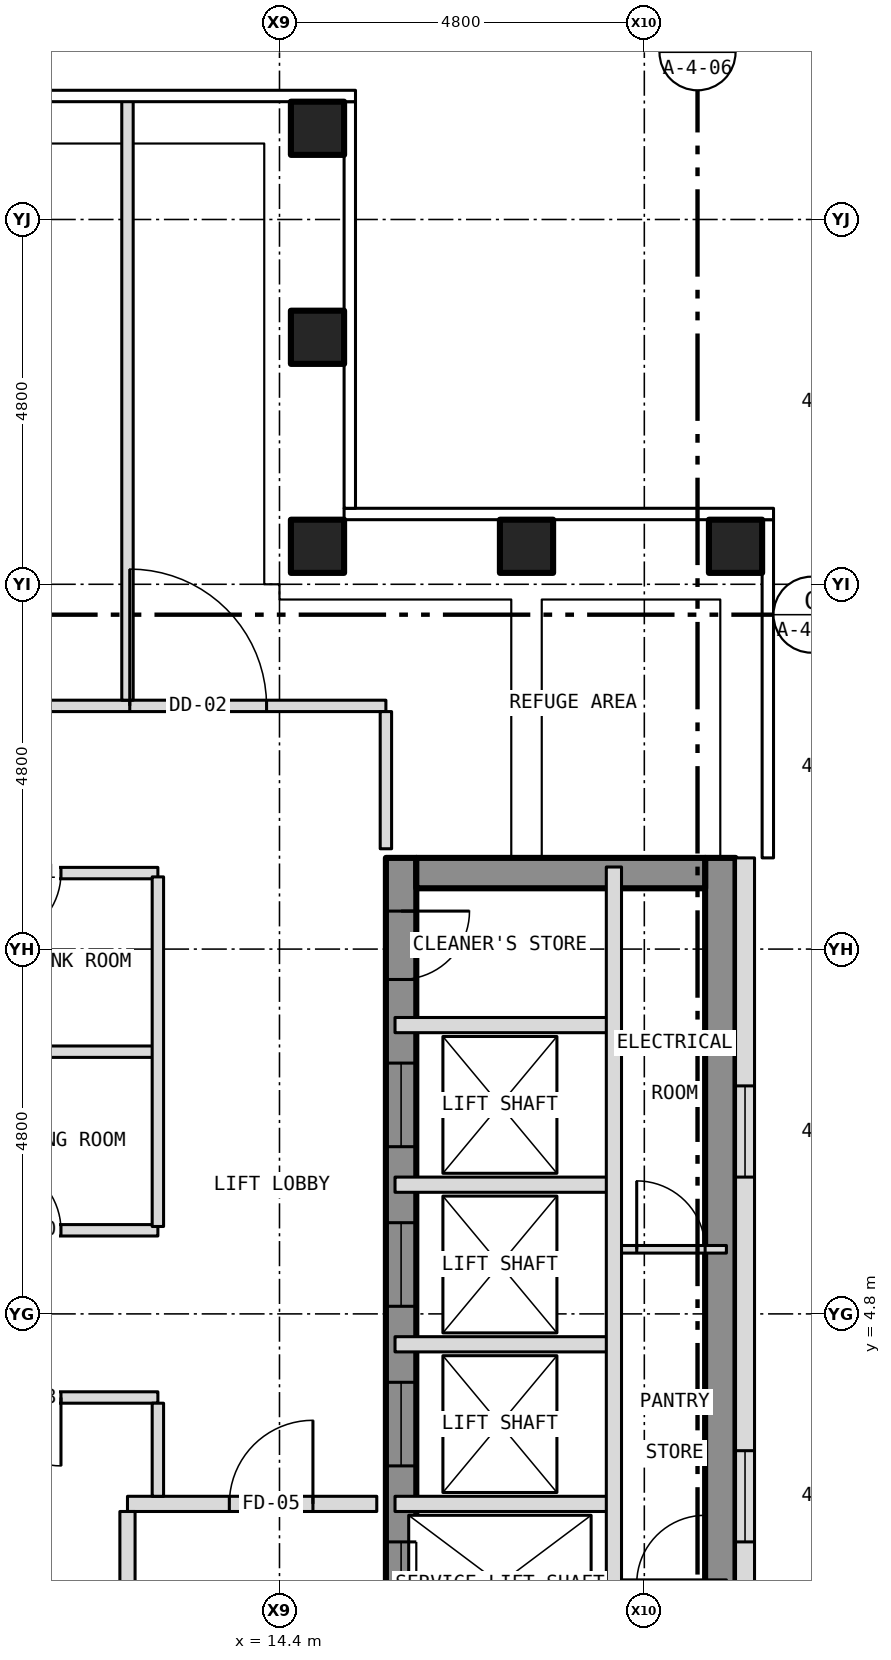
"""IFC4 building model, lengths in metres.
Left out: names, types, materials, properties, quantities, classifications, styles, units other than length and angle.
Written with IfcOpenShell. Run it as: python <this file> out.ifc"""

import sys

from ifc_helpers import new_model, si_unit, direction, frame, frame_2d, origin, origin_2d, place, context, subcontext, project, spatial, rectangle, hollow_rectangle, extrude, element, fill, save


model = new_model("IFC4")
c1 = context("Model", 3, precision=1e-05, world=origin(), true_north=direction((0.0, 1.0)))
c2 = subcontext(c1, "Body", "Model", "MODEL_VIEW")
j1 = project(units=[si_unit("LENGTHUNIT", "METRE"), si_unit("PLANEANGLEUNIT", "RADIAN")], contexts=[c1])
p1 = place(None, origin())
s1 = spatial("IfcSite", under=j1, at=p1, CompositionType="ELEMENT")
p2 = place(p1, origin())
s2 = spatial("IfcBuilding", under=s1, at=p2, CompositionType="ELEMENT")
p3 = place(p2, frame((0.0, 0.0, 236.5)))
s3 = spatial("IfcBuildingStorey", under=s2, at=p3, CompositionType="ELEMENT", Elevation=236.5)
for number, where, z_axis, x_axis in (
    (1, (14.9, 20.4, -0.3), (0.0, 0.0, 1.0), (1.0, 0.0, 0.0)),
    (2, (20.4, 14.9, -0.3), (0.0, 0.0, 1.0), (1.0, 0.0, 0.0)),
    (3, (14.9, 14.9, -0.3), (0.0, 0.0, 1.0), (1.0, 0.0, 0.0)),
    (4, (14.9, 17.65, -0.3), (0.0, 0.0, 1.0), (1.0, 0.0, 0.0)),
    (5, (17.65, 14.9, -0.3), (0.0, 0.0, 1.0), (1.0, 0.0, 0.0)),
):
    element("IfcColumn", number, at=place(p3, frame(where, z_axis=z_axis, x_axis=x_axis)), inside=s3, PredefinedType="COLUMN", context=c2, shape_type="SweptSolid", body=[
        extrude(hollow_rectangle(XDim=0.7, YDim=0.7, WallThickness=0.04, at=origin_2d()), origin(), (0.0, 0.0, 1.0), 4.65),
    ])
p4 = place(p3, frame((16.0, -10.8, 0.0), z_axis=(0.0, 0.0, 1.0), x_axis=(0.0, 1.0, 0.0)))
e6 = element("IfcWall", 6, at=p4, inside=s3, PredefinedType="SHEAR", context=c2, shape_type="SweptSolid", body=[
    extrude(rectangle(XDim=21.6, YDim=0.4, at=frame_2d((10.8, 0.0))), origin(), (0.0, 0.0, 1.0), 3.9),
])
p5 = place(p4, frame((9.4, 0.0, 0.0)))
e7 = element("IfcOpeningElement", 7, at=p5, cuts=e6, PredefinedType="OPENING", context=c2, shape_type="SweptSolid", body=[
    extrude(rectangle(XDim=1.1, YDim=2.1, at=frame_2d((0.55, 1.05))), frame((0.0, 0.212, 0.0), z_axis=(0.0, -1.0, 0.0), x_axis=(1.0, 0.0, 0.0)), (0.0, 0.0, 1.0), 0.424),
])
p6 = place(p4, frame((11.5, 0.0, 0.0)))
e8 = element("IfcOpeningElement", 8, at=p6, cuts=e6, PredefinedType="OPENING", context=c2, shape_type="SweptSolid", body=[
    extrude(rectangle(XDim=1.1, YDim=2.1, at=frame_2d((0.55, 1.05))), frame((0.0, 0.212, 0.0), z_axis=(0.0, -1.0, 0.0), x_axis=(1.0, 0.0, 0.0)), (0.0, 0.0, 1.0), 0.424),
])
p7 = place(p4, frame((13.6, 0.0, 0.0)))
e9 = element("IfcOpeningElement", 9, at=p7, cuts=e6, PredefinedType="OPENING", context=c2, shape_type="SweptSolid", body=[
    extrude(rectangle(XDim=1.1, YDim=2.1, at=frame_2d((0.55, 1.05))), frame((0.0, 0.212, 0.0), z_axis=(0.0, -1.0, 0.0), x_axis=(1.0, 0.0, 0.0)), (0.0, 0.0, 1.0), 0.424),
])
p8 = place(p4, frame((15.7, 0.0, 0.0)))
e10 = element("IfcOpeningElement", 10, at=p8, cuts=e6, PredefinedType="OPENING", context=c2, shape_type="SweptSolid", body=[
    extrude(rectangle(XDim=1.1, YDim=2.1, at=frame_2d((0.55, 1.05))), frame((0.0, 0.212, 0.0), z_axis=(0.0, -1.0, 0.0), x_axis=(1.0, 0.0, 0.0)), (0.0, 0.0, 1.0), 0.424),
])
p9 = place(p4, frame((17.8, 0.0, 0.0)))
e11 = element("IfcOpeningElement", 11, at=p9, cuts=e6, PredefinedType="OPENING", context=c2, shape_type="SweptSolid", body=[
    extrude(rectangle(XDim=1.1, YDim=2.1, at=frame_2d((0.55, 1.05))), frame((0.0, 0.212, 0.0), z_axis=(0.0, -1.0, 0.0), x_axis=(1.0, 0.0, 0.0)), (0.0, 0.0, 1.0), 0.424),
])
p10 = place(p4, frame((5.642, 0.0, 0.0)))
e12 = element("IfcOpeningElement", 12, at=p10, cuts=e6, PredefinedType="OPENING", context=c2, shape_type="SweptSolid", body=[
    extrude(rectangle(XDim=1.1, YDim=2.1, at=frame_2d((0.55, 1.05))), frame((0.0, 0.212, 0.0), z_axis=(0.0, -1.0, 0.0), x_axis=(1.0, 0.0, 0.0)), (0.0, 0.0, 1.0), 0.424),
])
p11 = place(p4, frame((7.5, 0.0, 0.0)))
e13 = element("IfcOpeningElement", 13, at=p11, cuts=e6, PredefinedType="OPENING", context=c2, shape_type="SweptSolid", body=[
    extrude(rectangle(XDim=1.1, YDim=2.1, at=frame_2d((0.55, 1.05))), frame((0.0, 0.212, 0.0), z_axis=(0.0, -1.0, 0.0), x_axis=(1.0, 0.0, 0.0)), (0.0, 0.0, 1.0), 0.424),
])
p12 = place(p4, frame((20.0, 0.0, 0.0)))
e14 = element("IfcOpeningElement", 14, at=p12, cuts=e6, PredefinedType="OPENING", context=c2, shape_type="SweptSolid", body=[
    extrude(rectangle(XDim=0.9, YDim=2.1, at=frame_2d((0.45, 1.05))), frame((0.0, 0.212, 0.0), z_axis=(0.0, -1.0, 0.0), x_axis=(1.0, 0.0, 0.0)), (0.0, 0.0, 1.0), 0.424),
])
p13 = place(p3, frame((20.2, -10.8, 0.0), z_axis=(0.0, 0.0, 1.0), x_axis=(0.0, 1.0, 0.0)))
e15 = element("IfcWall", 15, at=p13, inside=s3, PredefinedType="SHEAR", context=c2, shape_type="SweptSolid", body=[
    extrude(rectangle(XDim=21.6, YDim=0.4, at=frame_2d((10.8, 0.0))), origin(), (0.0, 0.0, 1.0), 3.9),
])
p14 = place(p3, frame((16.2, 10.6, 0.0), z_axis=(0.0, 0.0, 1.0), x_axis=(1.0, 0.0, 0.0)))
e16 = element("IfcWall", 16, at=p14, inside=s3, PredefinedType="SHEAR", context=c2, shape_type="SweptSolid", body=[
    extrude(rectangle(XDim=3.8, YDim=0.4, at=frame_2d((1.9, 0.0))), origin(), (0.0, 0.0, 1.0), 3.9),
])
p15 = place(p3, frame((20.525, -10.8, 0.0), z_axis=(0.0, 0.0, 1.0), x_axis=(0.0, 1.0, 0.0)))
e17 = element("IfcWall", 17, at=p15, inside=s3, PredefinedType="SOLIDWALL", context=c2, shape_type="SweptSolid", body=[
    extrude(rectangle(XDim=21.6, YDim=0.25, at=frame_2d((10.8, 0.0))), origin(), (0.0, 0.0, 1.0), 4.5),
])
p16 = place(p15, frame((3.0, 0.0, 2.2)))
e18 = element("IfcOpeningElement", 18, at=p16, cuts=e17, PredefinedType="OPENING", context=c2, shape_type="SweptSolid", body=[
    extrude(rectangle(XDim=1.2, YDim=0.6, at=frame_2d((0.6, 0.3))), frame((0.0, 0.137, 0.0), z_axis=(0.0, -1.0, 0.0), x_axis=(1.0, 0.0, 0.0)), (0.0, 0.0, 1.0), 0.274),
])
p17 = place(p15, frame((7.8, 0.0, 2.2)))
e19 = element("IfcOpeningElement", 19, at=p17, cuts=e17, PredefinedType="OPENING", context=c2, shape_type="SweptSolid", body=[
    extrude(rectangle(XDim=1.2, YDim=0.6, at=frame_2d((0.6, 0.3))), frame((0.0, 0.137, 0.0), z_axis=(0.0, -1.0, 0.0), x_axis=(1.0, 0.0, 0.0)), (0.0, 0.0, 1.0), 0.274),
])
p18 = place(p15, frame((12.6, 0.0, 2.2)))
e20 = element("IfcOpeningElement", 20, at=p18, cuts=e17, PredefinedType="OPENING", context=c2, shape_type="SweptSolid", body=[
    extrude(rectangle(XDim=1.2, YDim=0.6, at=frame_2d((0.6, 0.3))), frame((0.0, 0.137, 0.0), z_axis=(0.0, -1.0, 0.0), x_axis=(1.0, 0.0, 0.0)), (0.0, 0.0, 1.0), 0.274),
])
p19 = place(p15, frame((17.4, 0.0, 2.2)))
e21 = element("IfcOpeningElement", 21, at=p19, cuts=e17, PredefinedType="OPENING", context=c2, shape_type="SweptSolid", body=[
    extrude(rectangle(XDim=1.2, YDim=0.6, at=frame_2d((0.6, 0.3))), frame((0.0, 0.137, 0.0), z_axis=(0.0, -1.0, 0.0), x_axis=(1.0, 0.0, 0.0)), (0.0, 0.0, 1.0), 0.274),
])
p20 = place(p3, frame((12.4, 2.3, 0.0), z_axis=(0.0, 0.0, 1.0), x_axis=(1.0, 0.0, 0.0)))
e22 = element("IfcWall", 22, at=p20, inside=s3, PredefinedType="PARTITIONING", context=c2, shape_type="SweptSolid", body=[
    extrude(rectangle(XDim=3.28, YDim=0.2, at=frame_2d((1.64, 0.0))), origin(), (0.0, 0.0, 1.0), 4.35),
])
p21 = place(p20, frame((1.34, 0.0, 0.0)))
e23 = element("IfcOpeningElement", 23, at=p21, cuts=e22, PredefinedType="OPENING", context=c2, shape_type="SweptSolid", body=[
    extrude(rectangle(XDim=1.1, YDim=2.1, at=frame_2d((0.55, 1.05))), frame((0.0, 0.112, 0.0), z_axis=(0.0, -1.0, 0.0), x_axis=(1.0, 0.0, 0.0)), (0.0, 0.0, 1.0), 0.224),
])
p22 = place(p3, frame((15.92, 2.3, 0.0), z_axis=(0.0, 0.0, 1.0), x_axis=(1.0, 0.0, 0.0)))
e24 = element("IfcWall", 24, at=p22, inside=s3, PredefinedType="PARTITIONING", context=c2, shape_type="SweptSolid", body=[
    extrude(rectangle(XDim=2.88, YDim=0.2, at=frame_2d((1.44, 0.0))), origin(), (0.0, 0.0, 1.0), 3.9),
])
p23 = place(p3, frame((5.9, 3.7, 0.0), z_axis=(0.0, 0.0, 1.0), x_axis=(1.0, 0.0, 0.0)))
e25 = element("IfcWall", 25, at=p23, inside=s3, PredefinedType="PARTITIONING", context=c2, shape_type="SweptSolid", body=[
    extrude(rectangle(XDim=6.9, YDim=0.15, at=frame_2d((3.45, 0.0))), origin(), (0.0, 0.0, 1.0), 4.35),
])
p24 = place(p23, frame((4.725, 0.0, 0.0)))
e26 = element("IfcOpeningElement", 26, at=p24, cuts=e25, PredefinedType="OPENING", context=c2, shape_type="SweptSolid", body=[
    extrude(rectangle(XDim=0.9, YDim=2.1, at=frame_2d((0.45, 1.05))), frame((0.0, 0.087, 0.0), z_axis=(0.0, -1.0, 0.0), x_axis=(1.0, 0.0, 0.0)), (0.0, 0.0, 1.0), 0.174),
])
p25 = place(p3, frame((15.92, 4.4, 0.0), z_axis=(0.0, 0.0, 1.0), x_axis=(1.0, 0.0, 0.0)))
e27 = element("IfcWall", 27, at=p25, inside=s3, PredefinedType="PARTITIONING", context=c2, shape_type="SweptSolid", body=[
    extrude(rectangle(XDim=2.88, YDim=0.2, at=frame_2d((1.44, 0.0))), origin(), (0.0, 0.0, 1.0), 3.9),
])
p26 = place(p3, frame((18.8, 5.65, 0.0), z_axis=(0.0, 0.0, 1.0), x_axis=(1.0, 0.0, 0.0)))
e28 = element("IfcWall", 28, at=p26, inside=s3, PredefinedType="PARTITIONING", context=c2, shape_type="SweptSolid", body=[
    extrude(rectangle(XDim=1.48, YDim=0.1, at=frame_2d((0.74, 0.0))), origin(), (0.0, 0.0, 1.0), 3.9),
])
p27 = place(p26, frame((0.3, 0.0, 0.0)))
e29 = element("IfcOpeningElement", 29, at=p27, cuts=e28, PredefinedType="OPENING", context=c2, shape_type="SweptSolid", body=[
    extrude(rectangle(XDim=0.9, YDim=2.1, at=frame_2d((0.45, 1.05))), frame((0.0, 0.062, 0.0), z_axis=(0.0, -1.0, 0.0), x_axis=(1.0, 0.0, 0.0)), (0.0, 0.0, 1.0), 0.124),
])
p28 = place(p3, frame((5.9, 5.9, 0.0), z_axis=(0.0, 0.0, 1.0), x_axis=(1.0, 0.0, 0.0)))
e30 = element("IfcWall", 30, at=p28, inside=s3, PredefinedType="PARTITIONING", context=c2, shape_type="SweptSolid", body=[
    extrude(rectangle(XDim=6.9, YDim=0.15, at=frame_2d((3.45, 0.0))), origin(), (0.0, 0.0, 1.0), 4.35),
])
p29 = place(p28, frame((4.725, 0.0, 0.0)))
e31 = element("IfcOpeningElement", 31, at=p29, cuts=e30, PredefinedType="OPENING", context=c2, shape_type="SweptSolid", body=[
    extrude(rectangle(XDim=0.9, YDim=2.1, at=frame_2d((0.45, 1.05))), frame((0.0, 0.087, 0.0), z_axis=(0.0, -1.0, 0.0), x_axis=(1.0, 0.0, 0.0)), (0.0, 0.0, 1.0), 0.174),
])
p30 = place(p3, frame((15.92, 6.5, 0.0), z_axis=(0.0, 0.0, 1.0), x_axis=(1.0, 0.0, 0.0)))
e32 = element("IfcWall", 32, at=p30, inside=s3, PredefinedType="PARTITIONING", context=c2, shape_type="SweptSolid", body=[
    extrude(rectangle(XDim=2.88, YDim=0.2, at=frame_2d((1.44, 0.0))), origin(), (0.0, 0.0, 1.0), 3.9),
])
p31 = place(p3, frame((9.35, 8.25, 0.0), z_axis=(0.0, 0.0, 1.0), x_axis=(1.0, 0.0, 0.0)))
e33 = element("IfcWall", 33, at=p31, inside=s3, PredefinedType="PARTITIONING", context=c2, shape_type="SweptSolid", body=[
    extrude(rectangle(XDim=3.45, YDim=0.15, at=frame_2d((1.725, 0.0))), origin(), (0.0, 0.0, 1.0), 4.35),
])
p32 = place(p3, frame((15.92, 8.6, 0.0), z_axis=(0.0, 0.0, 1.0), x_axis=(1.0, 0.0, 0.0)))
e34 = element("IfcWall", 34, at=p32, inside=s3, PredefinedType="PARTITIONING", context=c2, shape_type="SweptSolid", body=[
    extrude(rectangle(XDim=2.88, YDim=0.2, at=frame_2d((1.44, 0.0))), origin(), (0.0, 0.0, 1.0), 3.9),
])
p33 = place(p3, frame((5.9, 10.6, 0.0), z_axis=(0.0, 0.0, 1.0), x_axis=(1.0, 0.0, 0.0)))
e35 = element("IfcWall", 35, at=p33, inside=s3, PredefinedType="PARTITIONING", context=c2, shape_type="SweptSolid", body=[
    extrude(rectangle(XDim=6.9, YDim=0.15, at=frame_2d((3.45, 0.0))), origin(), (0.0, 0.0, 1.0), 4.35),
])
p34 = place(p33, frame((4.725, 0.0, 0.0)))
e36 = element("IfcOpeningElement", 36, at=p34, cuts=e35, PredefinedType="OPENING", context=c2, shape_type="SweptSolid", body=[
    extrude(rectangle(XDim=0.9, YDim=2.1, at=frame_2d((0.45, 1.05))), frame((0.0, 0.087, 0.0), z_axis=(0.0, -1.0, 0.0), x_axis=(1.0, 0.0, 0.0)), (0.0, 0.0, 1.0), 0.174),
])
p35 = place(p3, frame((-15.8, 12.8, 0.0), z_axis=(0.0, 0.0, 1.0), x_axis=(1.0, 0.0, 0.0)))
e37 = element("IfcWall", 37, at=p35, inside=s3, PredefinedType="PARTITIONING", context=c2, shape_type="SweptSolid", body=[
    extrude(rectangle(XDim=31.6, YDim=0.15, at=frame_2d((15.8, 0.0))), origin(), (0.0, 0.0, 1.0), 4.35),
])
p36 = place(p35, frame((9.142, 0.0, 0.0)))
e38 = element("IfcOpeningElement", 38, at=p36, cuts=e37, PredefinedType="OPENING", context=c2, shape_type="SweptSolid", body=[
    extrude(rectangle(XDim=0.9, YDim=2.1, at=frame_2d((0.45, 1.05))), frame((0.0, 0.087, 0.0), z_axis=(0.0, -1.0, 0.0), x_axis=(1.0, 0.0, 0.0)), (0.0, 0.0, 1.0), 0.174),
])
p37 = place(p35, frame((21.559, 0.0, 0.0)))
e39 = element("IfcOpeningElement", 39, at=p37, cuts=e37, PredefinedType="OPENING", context=c2, shape_type="SweptSolid", body=[
    extrude(rectangle(XDim=0.9, YDim=2.1, at=frame_2d((0.45, 1.05))), frame((0.0, 0.087, 0.0), z_axis=(0.0, -1.0, 0.0), x_axis=(1.0, 0.0, 0.0)), (0.0, 0.0, 1.0), 0.174),
])
p38 = place(p35, frame((1.58, 0.0, 0.0)))
e40 = element("IfcOpeningElement", 40, at=p38, cuts=e37, PredefinedType="OPENING", context=c2, shape_type="SweptSolid", body=[
    extrude(rectangle(XDim=1.8, YDim=2.1, at=frame_2d((0.9, 1.05))), frame((0.0, 0.087, 0.0), z_axis=(0.0, -1.0, 0.0), x_axis=(1.0, 0.0, 0.0)), (0.0, 0.0, 1.0), 0.174),
])
p39 = place(p35, frame((28.23, 0.0, 0.0)))
e41 = element("IfcOpeningElement", 41, at=p39, cuts=e37, PredefinedType="OPENING", context=c2, shape_type="SweptSolid", body=[
    extrude(rectangle(XDim=1.8, YDim=2.1, at=frame_2d((0.9, 1.05))), frame((0.0, 0.087, 0.0), z_axis=(0.0, -1.0, 0.0), x_axis=(1.0, 0.0, 0.0)), (0.0, 0.0, 1.0), 0.174),
])
p40 = place(p3, frame((12.4, -1.8, 0.0), z_axis=(0.0, 0.0, 1.0), x_axis=(0.0, 1.0, 0.0)))
e42 = element("IfcWall", 42, at=p40, inside=s3, PredefinedType="PARTITIONING", context=c2, shape_type="SweptSolid", body=[
    extrude(rectangle(XDim=4.0, YDim=0.2, at=frame_2d((2.0, 0.0))), origin(), (0.0, 0.0, 1.0), 4.35),
])
p41 = place(p3, frame((12.4, 12.875, 0.0), z_axis=(0.0, 0.0, 1.0), x_axis=(0.0, 1.0, 0.0)))
e43 = element("IfcWall", 43, at=p41, inside=s3, PredefinedType="PARTITIONING", context=c2, shape_type="SweptSolid", body=[
    extrude(rectangle(XDim=7.905, YDim=0.15, at=frame_2d((3.953, 0.0))), origin(), (0.0, 0.0, 1.0), 4.35),
])
p42 = place(p3, frame((12.8, 2.4, 0.0), z_axis=(0.0, 0.0, 1.0), x_axis=(0.0, 1.0, 0.0)))
e44 = element("IfcWall", 44, at=p42, inside=s3, PredefinedType="PARTITIONING", context=c2, shape_type="SweptSolid", body=[
    extrude(rectangle(XDim=1.225, YDim=0.15, at=frame_2d((0.613, 0.0))), origin(), (0.0, 0.0, 1.0), 4.35),
])
p43 = place(p3, frame((12.8, 5.95, 0.0), z_axis=(0.0, 0.0, 1.0), x_axis=(0.0, 1.0, 0.0)))
e45 = element("IfcWall", 45, at=p43, inside=s3, PredefinedType="PARTITIONING", context=c2, shape_type="SweptSolid", body=[
    extrude(rectangle(XDim=4.6, YDim=0.15, at=frame_2d((2.3, 0.0))), origin(), (0.0, 0.0, 1.0), 4.35),
])
p44 = place(p3, frame((15.8, 10.92, 0.0), z_axis=(0.0, 0.0, 1.0), x_axis=(0.0, 1.0, 0.0)))
e46 = element("IfcWall", 46, at=p44, inside=s3, PredefinedType="PARTITIONING", context=c2, shape_type="SweptSolid", body=[
    extrude(rectangle(XDim=1.805, YDim=0.15, at=frame_2d((0.903, 0.0))), origin(), (0.0, 0.0, 1.0), 4.35),
])
p45 = place(p3, frame((18.8, -1.8, 0.0), z_axis=(0.0, 0.0, 1.0), x_axis=(0.0, 1.0, 0.0)))
e47 = element("IfcWall", 47, at=p45, inside=s3, PredefinedType="PARTITIONING", context=c2, shape_type="SweptSolid", body=[
    extrude(rectangle(XDim=12.48, YDim=0.2, at=frame_2d((6.24, 0.0))), origin(), (0.0, 0.0, 1.0), 3.9),
])
p46 = place(p18, origin())
e48 = element("IfcWindow", 48, at=p46, inside=s3, PartitioningType="SINGLE_PANEL", PredefinedType="WINDOW", context=c2, shape_type="SweptSolid", body=[
    extrude(rectangle(XDim=1.2, YDim=0.6, at=frame_2d((0.6, 0.3))), frame((0.0, -0.035, 0.0), z_axis=(0.0, -1.0, 0.0), x_axis=(1.0, 0.0, 0.0)), (0.0, 0.0, 1.0), 0.06),
])
fill(e20, e48)
p47 = place(p19, origin())
e49 = element("IfcWindow", 49, at=p47, inside=s3, PartitioningType="SINGLE_PANEL", PredefinedType="WINDOW", context=c2, shape_type="SweptSolid", body=[
    extrude(rectangle(XDim=1.2, YDim=0.6, at=frame_2d((0.6, 0.3))), frame((0.0, -0.035, 0.0), z_axis=(0.0, -1.0, 0.0), x_axis=(1.0, 0.0, 0.0)), (0.0, 0.0, 1.0), 0.06),
])
fill(e21, e49)
p48 = place(p6, origin())
e50 = element("IfcDoor", 50, at=p48, inside=s3, OperationType="SLIDING_TO_LEFT", PredefinedType="DOOR", context=c2, shape_type="SweptSolid", body=[
    extrude(rectangle(XDim=1.1, YDim=2.1, at=frame_2d((0.55, 1.05))), frame((0.0, 0.025, 0.0), z_axis=(0.0, -1.0, 0.0), x_axis=(1.0, 0.0, 0.0)), (0.0, 0.0, 1.0), 0.05),
])
fill(e8, e50)
p49 = place(p7, origin())
e51 = element("IfcDoor", 51, at=p49, inside=s3, OperationType="SLIDING_TO_LEFT", PredefinedType="DOOR", context=c2, shape_type="SweptSolid", body=[
    extrude(rectangle(XDim=1.1, YDim=2.1, at=frame_2d((0.55, 1.05))), frame((0.0, 0.025, 0.0), z_axis=(0.0, -1.0, 0.0), x_axis=(1.0, 0.0, 0.0)), (0.0, 0.0, 1.0), 0.05),
])
fill(e9, e51)
p50 = place(p8, origin())
e52 = element("IfcDoor", 52, at=p50, inside=s3, OperationType="SLIDING_TO_LEFT", PredefinedType="DOOR", context=c2, shape_type="SweptSolid", body=[
    extrude(rectangle(XDim=1.1, YDim=2.1, at=frame_2d((0.55, 1.05))), frame((0.0, 0.025, 0.0), z_axis=(0.0, -1.0, 0.0), x_axis=(1.0, 0.0, 0.0)), (0.0, 0.0, 1.0), 0.05),
])
fill(e10, e52)
p51 = place(p9, origin())
e53 = element("IfcDoor", 53, at=p51, inside=s3, OperationType="SLIDING_TO_LEFT", PredefinedType="DOOR", context=c2, shape_type="SweptSolid", body=[
    extrude(rectangle(XDim=1.1, YDim=2.1, at=frame_2d((0.55, 1.05))), frame((0.0, 0.025, 0.0), z_axis=(0.0, -1.0, 0.0), x_axis=(1.0, 0.0, 0.0)), (0.0, 0.0, 1.0), 0.05),
])
fill(e11, e53)
p52 = place(p12, origin())
e54 = element("IfcDoor", 54, at=p52, inside=s3, OperationType="SINGLE_SWING_RIGHT", PredefinedType="DOOR", context=c2, shape_type="SweptSolid", body=[
    extrude(rectangle(XDim=0.9, YDim=2.1, at=frame_2d((0.45, 1.05))), frame((0.0, 0.025, 0.0), z_axis=(0.0, -1.0, 0.0), x_axis=(1.0, 0.0, 0.0)), (0.0, 0.0, 1.0), 0.05),
])
fill(e14, e54)
p53 = place(p27, origin())
e55 = element("IfcDoor", 55, at=p53, inside=s3, OperationType="SINGLE_SWING_LEFT", PredefinedType="DOOR", context=c2, shape_type="SweptSolid", body=[
    extrude(rectangle(XDim=0.9, YDim=2.1, at=frame_2d((0.45, 1.05))), frame((0.0, 0.025, 0.0), z_axis=(0.0, -1.0, 0.0), x_axis=(1.0, 0.0, 0.0)), (0.0, 0.0, 1.0), 0.05),
])
fill(e29, e55)
p54 = place(p21, origin())
e56 = element("IfcDoor", 56, at=p54, inside=s3, OperationType="SINGLE_SWING_RIGHT", PredefinedType="DOOR", context=c2, shape_type="SweptSolid", body=[
    extrude(rectangle(XDim=1.1, YDim=2.1, at=frame_2d((0.55, 1.05))), frame((0.0, 0.025, 0.0), z_axis=(0.0, -1.0, 0.0), x_axis=(1.0, 0.0, 0.0)), (0.0, 0.0, 1.0), 0.05),
])
fill(e23, e56)
p55 = place(p39, origin())
e57 = element("IfcDoor", 57, at=p55, inside=s3, OperationType="DOUBLE_DOOR_SINGLE_SWING", PredefinedType="DOOR", context=c2, shape_type="SweptSolid", body=[
    extrude(rectangle(XDim=1.8, YDim=2.1, at=frame_2d((0.9, 1.05))), frame((0.0, 0.025, 0.0), z_axis=(0.0, -1.0, 0.0), x_axis=(1.0, 0.0, 0.0)), (0.0, 0.0, 1.0), 0.05),
])
fill(e41, e57)
p56 = place(p24, origin())
e58 = element("IfcDoor", 58, at=p56, inside=s3, OperationType="SINGLE_SWING_RIGHT", PredefinedType="DOOR", context=c2, shape_type="SweptSolid", body=[
    extrude(rectangle(XDim=0.9, YDim=2.1, at=frame_2d((0.45, 1.05))), frame((0.0, 0.025, 0.0), z_axis=(0.0, -1.0, 0.0), x_axis=(1.0, 0.0, 0.0)), (0.0, 0.0, 1.0), 0.05),
])
fill(e26, e58)
p57 = place(p29, origin())
e59 = element("IfcDoor", 59, at=p57, inside=s3, OperationType="SINGLE_SWING_LEFT", PredefinedType="DOOR", context=c2, shape_type="SweptSolid", body=[
    extrude(rectangle(XDim=0.9, YDim=2.1, at=frame_2d((0.45, 1.05))), frame((0.0, 0.025, 0.0), z_axis=(0.0, -1.0, 0.0), x_axis=(1.0, 0.0, 0.0)), (0.0, 0.0, 1.0), 0.05),
])
fill(e31, e59)
p58 = place(p34, origin())
e60 = element("IfcDoor", 60, at=p58, inside=s3, OperationType="SINGLE_SWING_LEFT", PredefinedType="DOOR", context=c2, shape_type="SweptSolid", body=[
    extrude(rectangle(XDim=0.9, YDim=2.1, at=frame_2d((0.45, 1.05))), frame((0.0, 0.025, 0.0), z_axis=(0.0, -1.0, 0.0), x_axis=(1.0, 0.0, 0.0)), (0.0, 0.0, 1.0), 0.05),
])
fill(e36, e60)
save(model, sys.argv[1])
